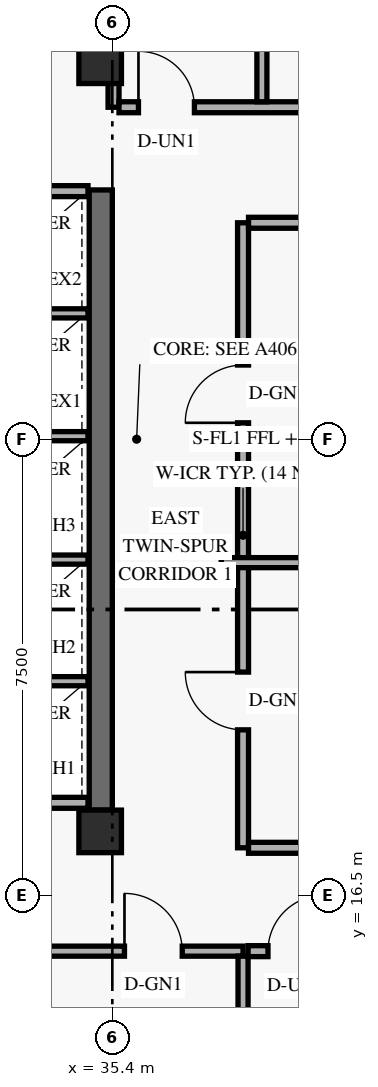
"""IFC4 building model, lengths in metres.
Left out: names, types, materials, properties, quantities, classifications, styles, units other than length and angle.
Written with IfcOpenShell. Run it as: python <this file> out.ifc"""

import sys

from ifc_helpers import new_model, si_unit, direction, frame, frame_2d, origin, origin_2d, place, context, subcontext, project, spatial, rectangle, extrude, element, fill, save


model = new_model("IFC4")
c1 = context("Model", 3, precision=1e-05, world=origin(), true_north=direction((0.0, 1.0)))
c2 = subcontext(c1, "Body", "Model", "MODEL_VIEW")
j1 = project(units=[si_unit("LENGTHUNIT", "METRE"), si_unit("PLANEANGLEUNIT", "RADIAN")], contexts=[c1])
p1 = place(None, origin())
s1 = spatial("IfcSite", under=j1, at=p1, CompositionType="ELEMENT")
p2 = place(p1, origin())
s2 = spatial("IfcBuilding", under=s1, at=p2, CompositionType="ELEMENT")
p3 = place(p2, frame((0.0, 0.0, 181.2)))
s3 = spatial("IfcBuildingStorey", under=s2, at=p3, CompositionType="ELEMENT", Elevation=181.2)
p4 = place(p3, frame((35.21, 17.9, 0.0), z_axis=(0.0, 0.0, 1.0), x_axis=(0.0, 1.0, 0.0)))
e1 = element("IfcWall", 1, at=p4, inside=s3, PredefinedType="SHEAR", context=c2, shape_type="SweptSolid", body=[
    extrude(rectangle(XDim=10.2, YDim=0.38, at=frame_2d((5.1, 0.0))), origin(), (0.0, 0.0, 1.0), 2.748),
])
for number, where, z_axis, x_axis in (
    (2, (35.2, 17.55, 0.0), (0.0, 0.0, 1.0), (1.0, 0.0, 0.0)),
    (3, (35.2, 30.2, 0.0), (0.0, 0.0, 1.0), (1.0, 0.0, 0.0)),
):
    element("IfcColumn", number, at=place(p3, frame(where, z_axis=z_axis, x_axis=x_axis)), inside=s3, PredefinedType="COLUMN", context=c2, shape_type="SweptSolid", body=[
        extrude(rectangle(XDim=0.7, YDim=0.7, at=origin_2d()), origin(), (0.0, 0.0, 1.0), 3.6),
    ])
for number, where, z_axis, x_axis in (
    (4, (32.74, 18.02, 0.0), (0.0, 0.0, 1.0), (1.0, 0.0, 0.0)),
    (5, (32.74, 28.08, 0.0), (0.0, 0.0, 1.0), (1.0, 0.0, 0.0)),
):
    element("IfcWall", number, at=place(p3, frame(where, z_axis=z_axis, x_axis=x_axis)), inside=s3, PredefinedType="STANDARD", context=c2, shape_type="SweptSolid", body=[
        extrude(rectangle(XDim=2.26, YDim=0.18, at=frame_2d((1.13, 0.0))), origin(), (0.0, 0.0, 1.0), 3.36),
    ])
for number, where, z_axis, x_axis in (
    (6, (32.74, 20.02, 0.0), (0.0, 0.0, 1.0), (1.0, 0.0, 0.0)),
    (7, (32.74, 22.02, 0.0), (0.0, 0.0, 1.0), (1.0, 0.0, 0.0)),
    (8, (32.74, 24.05, 0.0), (0.0, 0.0, 1.0), (1.0, 0.0, 0.0)),
    (9, (32.74, 26.07, 0.0), (0.0, 0.0, 1.0), (1.0, 0.0, 0.0)),
):
    element("IfcWall", number, at=place(p3, frame(where, z_axis=z_axis, x_axis=x_axis)), inside=s3, PredefinedType="STANDARD", context=c2, shape_type="SweptSolid", body=[
        extrude(rectangle(XDim=2.26, YDim=0.15, at=frame_2d((1.13, 0.0))), origin(), (0.0, 0.0, 1.0), 3.36),
    ])
p5 = place(p3, frame((32.732, 15.58, 0.0), z_axis=(0.0, 0.0, 1.0), x_axis=(1.0, 0.0, 0.0)))
e10 = element("IfcWall", 10, at=p5, inside=s3, PredefinedType="PARTITIONING", context=c2, shape_type="SweptSolid", body=[
    extrude(rectangle(XDim=4.818, YDim=0.165, at=frame_2d((2.409, 0.0))), origin(), (0.0, 0.0, 1.0), 2.73),
])
p6 = place(p5, frame((2.867, 0.0, 0.0)))
e11 = element("IfcOpeningElement", 11, at=p6, cuts=e10, PredefinedType="OPENING", context=c2, shape_type="SweptSolid", body=[
    extrude(rectangle(XDim=0.95, YDim=2.15, at=frame_2d((0.475, 1.075))), frame((0.0, 0.093, 0.0), z_axis=(0.0, -1.0, 0.0), x_axis=(1.0, 0.0, 0.0)), (0.0, 0.0, 1.0), 0.185),
])
p7 = place(p3, frame((37.55, 9.25, 0.0), z_axis=(0.0, 0.0, 1.0), x_axis=(0.0, 1.0, 0.0)))
e12 = element("IfcWall", 12, at=p7, inside=s3, PredefinedType="PARTITIONING", context=c2, shape_type="SweptSolid", body=[
    extrude(rectangle(XDim=6.248, YDim=0.165, at=frame_2d((3.124, 0.0))), origin(), (0.0, 0.0, 1.0), 2.73),
])
p8 = place(p3, frame((37.55, 17.28, 0.0), z_axis=(0.0, 0.0, 1.0), x_axis=(0.0, 1.0, 0.0)))
e13 = element("IfcWall", 13, at=p8, inside=s3, PredefinedType="STANDARD", context=c2, shape_type="SweptSolid", body=[
    extrude(rectangle(XDim=10.28, YDim=0.18, at=frame_2d((5.14, 0.0))), origin(), (0.0, 0.0, 1.0), 2.73),
])
p9 = place(p8, frame((1.94, 0.0, 0.0)))
e14 = element("IfcOpeningElement", 14, at=p9, cuts=e13, PredefinedType="OPENING", context=c2, shape_type="SweptSolid", body=[
    extrude(rectangle(XDim=0.95, YDim=2.15, at=frame_2d((0.475, 1.075))), frame((0.0, 0.1, 0.0), z_axis=(0.0, -1.0, 0.0), x_axis=(1.0, 0.0, 0.0)), (0.0, 0.0, 1.0), 0.2),
])
p10 = place(p8, frame((6.99, 0.0, 0.0)))
e15 = element("IfcOpeningElement", 15, at=p10, cuts=e13, PredefinedType="OPENING", context=c2, shape_type="SweptSolid", body=[
    extrude(rectangle(XDim=0.95, YDim=2.15, at=frame_2d((0.475, 1.075))), frame((0.0, 0.1, 0.0), z_axis=(0.0, -1.0, 0.0), x_axis=(1.0, 0.0, 0.0)), (0.0, 0.0, 1.0), 0.2),
])
p11 = place(p3, frame((37.633, 15.58, 0.0), z_axis=(0.0, 0.0, 1.0), x_axis=(1.0, 0.0, 0.0)))
e16 = element("IfcWall", 16, at=p11, inside=s3, PredefinedType="STANDARD", context=c2, shape_type="SweptSolid", body=[
    extrude(rectangle(XDim=10.167, YDim=0.18, at=frame_2d((5.084, 0.0))), origin(), (0.0, 0.0, 1.0), 2.73),
])
p12 = place(p11, frame((0.327, 0.0, 0.0)))
e17 = element("IfcOpeningElement", 17, at=p12, cuts=e16, PredefinedType="OPENING", context=c2, shape_type="SweptSolid", body=[
    extrude(rectangle(XDim=0.92, YDim=2.15, at=frame_2d((0.46, 1.075))), frame((0.0, 0.1, 0.0), z_axis=(0.0, -1.0, 0.0), x_axis=(1.0, 0.0, 0.0)), (0.0, 0.0, 1.0), 0.2),
])
p13 = place(p3, frame((37.64, 17.28, 0.0), z_axis=(0.0, 0.0, 1.0), x_axis=(1.0, 0.0, 0.0)))
e18 = element("IfcWall", 18, at=p13, inside=s3, PredefinedType="STANDARD", context=c2, shape_type="SweptSolid", body=[
    extrude(rectangle(XDim=10.16, YDim=0.18, at=frame_2d((5.08, 0.0))), origin(), (0.0, 0.0, 1.0), 2.73),
])
p14 = place(p13, frame((7.137, 0.0, 0.0)))
e19 = element("IfcOpeningElement", 19, at=p14, cuts=e18, PredefinedType="OPENING", context=c2, shape_type="SweptSolid", body=[
    extrude(rectangle(XDim=0.92, YDim=2.15, at=frame_2d((0.46, 1.075))), frame((0.0, 0.1, 0.0), z_axis=(0.0, -1.0, 0.0), x_axis=(1.0, 0.0, 0.0)), (0.0, 0.0, 1.0), 0.2),
])
p15 = place(p3, frame((37.64, 27.56, 0.0), z_axis=(0.0, 0.0, 1.0), x_axis=(1.0, 0.0, 0.0)))
e20 = element("IfcWall", 20, at=p15, inside=s3, PredefinedType="STANDARD", context=c2, shape_type="SweptSolid", body=[
    extrude(rectangle(XDim=10.16, YDim=0.18, at=frame_2d((5.08, 0.0))), origin(), (0.0, 0.0, 1.0), 2.73),
])
p16 = place(p3, frame((35.42, 29.46, 0.0), z_axis=(0.0, 0.0, 1.0), x_axis=(0.0, 1.0, 0.0)))
e21 = element("IfcWall", 21, at=p16, inside=s3, PredefinedType="STANDARD", context=c2, shape_type="SweptSolid", body=[
    extrude(rectangle(XDim=1.89, YDim=0.18, at=frame_2d((0.945, 0.0))), origin(), (0.0, 0.0, 1.0), 2.73),
])
p17 = place(p3, frame((35.51, 29.46, 0.0), z_axis=(0.0, 0.0, 1.0), x_axis=(1.0, 0.0, 0.0)))
e22 = element("IfcWall", 22, at=p17, inside=s3, PredefinedType="STANDARD", context=c2, shape_type="SweptSolid", body=[
    extrude(rectangle(XDim=12.29, YDim=0.18, at=frame_2d((6.145, 0.0))), origin(), (0.0, 0.0, 1.0), 2.73),
])
p18 = place(p17, frame((0.32, 0.0, 0.0)))
e23 = element("IfcOpeningElement", 23, at=p18, cuts=e22, PredefinedType="OPENING", context=c2, shape_type="SweptSolid", body=[
    extrude(rectangle(XDim=0.92, YDim=2.15, at=frame_2d((0.46, 1.075))), frame((0.0, 0.1, 0.0), z_axis=(0.0, -1.0, 0.0), x_axis=(1.0, 0.0, 0.0)), (0.0, 0.0, 1.0), 0.2),
])
p19 = place(p3, frame((37.86, 29.55, 0.0), z_axis=(0.0, 0.0, 1.0), x_axis=(0.0, 1.0, 0.0)))
e24 = element("IfcWall", 24, at=p19, inside=s3, PredefinedType="PARTITIONING", context=c2, shape_type="SweptSolid", body=[
    extrude(rectangle(XDim=14.17, YDim=0.165, at=frame_2d((7.085, 0.0))), origin(), (0.0, 0.0, 1.0), 2.73),
])
p20 = place(p19, frame((6.61, 0.0, 0.0)))
e25 = element("IfcOpeningElement", 25, at=p20, cuts=e24, PredefinedType="OPENING", context=c2, shape_type="SweptSolid", body=[
    extrude(rectangle(XDim=0.95, YDim=2.15, at=frame_2d((0.475, 1.075))), frame((0.0, 0.093, 0.0), z_axis=(0.0, -1.0, 0.0), x_axis=(1.0, 0.0, 0.0)), (0.0, 0.0, 1.0), 0.185),
])
p21 = place(p3, frame((37.19, 21.97, 0.0), z_axis=(0.0, 0.0, 1.0), x_axis=(1.0, 0.0, 0.0)))
e26 = element("IfcWall", 26, at=p21, inside=s3, PredefinedType="PARTITIONING", context=c2, shape_type="SweptSolid", body=[
    extrude(rectangle(XDim=5.845, YDim=0.165, at=frame_2d((2.922, 0.0))), origin(), (0.0, 0.0, 1.0), 3.36),
])
p22 = place(p6, origin())
e27 = element("IfcDoor", 27, at=p22, inside=s3, OperationType="SINGLE_SWING_LEFT", PredefinedType="DOOR", context=c2, shape_type="SweptSolid", body=[
    extrude(rectangle(XDim=0.95, YDim=2.15, at=frame_2d((0.475, 1.075))), frame((0.0, 0.025, 0.0), z_axis=(0.0, -1.0, 0.0), x_axis=(1.0, 0.0, 0.0)), (0.0, 0.0, 1.0), 0.05),
])
fill(e11, e27)
p23 = place(p12, origin())
e28 = element("IfcDoor", 28, at=p23, inside=s3, OperationType="SINGLE_SWING_RIGHT", PredefinedType="DOOR", context=c2, shape_type="SweptSolid", body=[
    extrude(rectangle(XDim=0.92, YDim=2.15, at=frame_2d((0.46, 1.075))), frame((0.0, 0.025, 0.0), z_axis=(0.0, -1.0, 0.0), x_axis=(1.0, 0.0, 0.0)), (0.0, 0.0, 1.0), 0.05),
])
fill(e17, e28)
p24 = place(p18, origin())
e29 = element("IfcDoor", 29, at=p24, inside=s3, OperationType="SINGLE_SWING_LEFT", PredefinedType="DOOR", context=c2, shape_type="SweptSolid", body=[
    extrude(rectangle(XDim=0.92, YDim=2.15, at=frame_2d((0.46, 1.075))), frame((0.0, 0.025, 0.0), z_axis=(0.0, -1.0, 0.0), x_axis=(1.0, 0.0, 0.0)), (0.0, 0.0, 1.0), 0.05),
])
fill(e23, e29)
p25 = place(p9, origin())
e30 = element("IfcDoor", 30, at=p25, inside=s3, OperationType="SINGLE_SWING_RIGHT", PredefinedType="DOOR", context=c2, shape_type="SweptSolid", body=[
    extrude(rectangle(XDim=0.95, YDim=2.15, at=frame_2d((0.475, 1.075))), frame((0.0, 0.025, 0.0), z_axis=(0.0, -1.0, 0.0), x_axis=(1.0, 0.0, 0.0)), (0.0, 0.0, 1.0), 0.05),
])
fill(e14, e30)
p26 = place(p10, origin())
e31 = element("IfcDoor", 31, at=p26, inside=s3, OperationType="SINGLE_SWING_LEFT", PredefinedType="DOOR", context=c2, shape_type="SweptSolid", body=[
    extrude(rectangle(XDim=0.95, YDim=2.15, at=frame_2d((0.475, 1.075))), frame((0.0, 0.025, 0.0), z_axis=(0.0, -1.0, 0.0), x_axis=(1.0, 0.0, 0.0)), (0.0, 0.0, 1.0), 0.05),
])
fill(e15, e31)
save(model, sys.argv[1])
